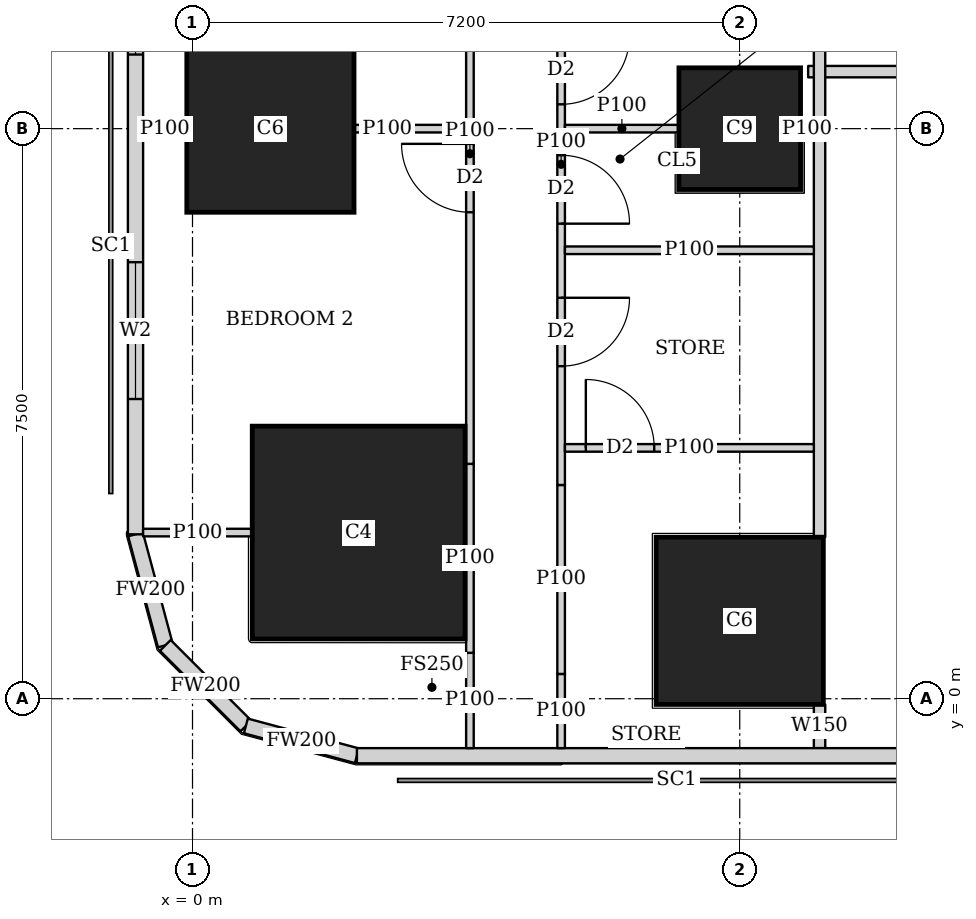
"""IFC4 building model, lengths in metres.
Left out: names, types, materials, properties, quantities, classifications, styles, units other than length and angle.
Written with IfcOpenShell. Run it as: python <this file> out.ifc"""

import sys

from ifc_helpers import new_model, si_unit, direction, frame, frame_2d, origin, origin_2d, place, context, subcontext, project, spatial, rectangle, extrude, element, fill, save


model = new_model("IFC4")
c1 = context("Model", 3, precision=1e-05, world=origin(), true_north=direction((0.0, 1.0)))
c2 = subcontext(c1, "Body", "Model", "MODEL_VIEW")
j1 = project(units=[si_unit("LENGTHUNIT", "METRE"), si_unit("PLANEANGLEUNIT", "RADIAN")], contexts=[c1])
p1 = place(None, origin())
s1 = spatial("IfcSite", under=j1, at=p1, CompositionType="ELEMENT")
p2 = place(p1, origin())
s2 = spatial("IfcBuilding", under=s1, at=p2, CompositionType="ELEMENT")
p3 = place(p2, frame((0.0, 0.0, 122.9)))
s3 = spatial("IfcBuildingStorey", under=s2, at=p3, CompositionType="ELEMENT", Elevation=122.9)
p4 = place(p3, frame((7.2, 1.025, 0.0), z_axis=(0.0, 0.0, 1.0), x_axis=(1.0, 0.0, 0.0)))
e1 = element("IfcColumn", 1, at=p4, inside=s3, PredefinedType="COLUMN", context=c2, shape_type="SweptSolid", body=[
    extrude(rectangle(XDim=2.2, YDim=2.2, at=origin_2d()), origin(), (0.0, 0.0, 1.0), 3.75),
])
p5 = place(p3, frame((2.186, 2.186, 0.0), z_axis=(0.0, 0.0, 1.0), x_axis=(1.0, 0.0, 0.0)))
e2 = element("IfcColumn", 2, at=p5, inside=s3, PredefinedType="COLUMN", context=c2, shape_type="SweptSolid", body=[
    extrude(rectangle(XDim=2.8, YDim=2.8, at=origin_2d()), origin(), (0.0, 0.0, 1.0), 3.75),
])
p6 = place(p3, frame((1.025, 7.5, 0.0), z_axis=(0.0, 0.0, 1.0), x_axis=(1.0, 0.0, 0.0)))
e3 = element("IfcColumn", 3, at=p6, inside=s3, PredefinedType="COLUMN", context=c2, shape_type="SweptSolid", body=[
    extrude(rectangle(XDim=2.2, YDim=2.2, at=origin_2d()), origin(), (0.0, 0.0, 1.0), 3.75),
])
p7 = place(p3, frame((7.2, 7.5, 0.0), z_axis=(0.0, 0.0, 1.0), x_axis=(1.0, 0.0, 0.0)))
e4 = element("IfcColumn", 4, at=p7, inside=s3, PredefinedType="COLUMN", context=c2, shape_type="SweptSolid", body=[
    extrude(rectangle(XDim=1.6, YDim=1.6, at=origin_2d()), origin(), (0.0, 0.0, 1.0), 3.75),
])
p8 = place(p3, frame((2.163, -0.75, 0.0), z_axis=(0.0, 0.0, 1.0), x_axis=(1.0, 0.0, 0.0)))
e5 = element("IfcWall", 5, at=p8, inside=s3, PredefinedType="SOLIDWALL", context=c2, shape_type="SweptSolid", body=[
    extrude(rectangle(XDim=45.628, YDim=0.2, at=frame_2d((22.814, 0.0))), origin(), (0.0, 0.0, 1.0), 3.5),
])
p9 = place(p8, frame((9.537, 0.0, 0.9)))
e6 = element("IfcOpeningElement", 6, at=p9, cuts=e5, PredefinedType="OPENING", context=c2, shape_type="SweptSolid", body=[
    extrude(rectangle(XDim=1.8, YDim=1.5, at=frame_2d((0.9, 0.75))), frame((0.0, 0.11, 0.0), z_axis=(0.0, -1.0, 0.0), x_axis=(1.0, 0.0, 0.0)), (0.0, 0.0, 1.0), 0.22),
])
p10 = place(p8, frame((13.137, 0.0, 0.9)))
e7 = element("IfcOpeningElement", 7, at=p10, cuts=e5, PredefinedType="OPENING", context=c2, shape_type="SweptSolid", body=[
    extrude(rectangle(XDim=1.8, YDim=1.5, at=frame_2d((0.9, 0.75))), frame((0.0, 0.11, 0.0), z_axis=(0.0, -1.0, 0.0), x_axis=(1.0, 0.0, 0.0)), (0.0, 0.0, 1.0), 0.22),
])
p11 = place(p8, frame((16.737, 0.0, 0.9)))
e8 = element("IfcOpeningElement", 8, at=p11, cuts=e5, PredefinedType="OPENING", context=c2, shape_type="SweptSolid", body=[
    extrude(rectangle(XDim=1.8, YDim=1.5, at=frame_2d((0.9, 0.75))), frame((0.0, 0.11, 0.0), z_axis=(0.0, -1.0, 0.0), x_axis=(1.0, 0.0, 0.0)), (0.0, 0.0, 1.0), 0.22),
])
p12 = place(p8, frame((20.337, 0.0, 0.9)))
e9 = element("IfcOpeningElement", 9, at=p12, cuts=e5, PredefinedType="OPENING", context=c2, shape_type="SweptSolid", body=[
    extrude(rectangle(XDim=1.8, YDim=1.5, at=frame_2d((0.9, 0.75))), frame((0.0, 0.11, 0.0), z_axis=(0.0, -1.0, 0.0), x_axis=(1.0, 0.0, 0.0)), (0.0, 0.0, 1.0), 0.22),
])
p13 = place(p8, frame((23.937, 0.0, 0.9)))
e10 = element("IfcOpeningElement", 10, at=p13, cuts=e5, PredefinedType="OPENING", context=c2, shape_type="SweptSolid", body=[
    extrude(rectangle(XDim=1.8, YDim=1.5, at=frame_2d((0.9, 0.75))), frame((0.0, 0.11, 0.0), z_axis=(0.0, -1.0, 0.0), x_axis=(1.0, 0.0, 0.0)), (0.0, 0.0, 1.0), 0.22),
])
p14 = place(p8, frame((27.537, 0.0, 0.9)))
e11 = element("IfcOpeningElement", 11, at=p14, cuts=e5, PredefinedType="OPENING", context=c2, shape_type="SweptSolid", body=[
    extrude(rectangle(XDim=1.8, YDim=1.5, at=frame_2d((0.9, 0.75))), frame((0.0, 0.11, 0.0), z_axis=(0.0, -1.0, 0.0), x_axis=(1.0, 0.0, 0.0)), (0.0, 0.0, 1.0), 0.22),
])
p15 = place(p8, frame((31.137, 0.0, 0.9)))
e12 = element("IfcOpeningElement", 12, at=p15, cuts=e5, PredefinedType="OPENING", context=c2, shape_type="SweptSolid", body=[
    extrude(rectangle(XDim=1.8, YDim=1.5, at=frame_2d((0.9, 0.75))), frame((0.0, 0.11, 0.0), z_axis=(0.0, -1.0, 0.0), x_axis=(1.0, 0.0, 0.0)), (0.0, 0.0, 1.0), 0.22),
])
p16 = place(p8, frame((34.737, 0.0, 0.9)))
e13 = element("IfcOpeningElement", 13, at=p16, cuts=e5, PredefinedType="OPENING", context=c2, shape_type="SweptSolid", body=[
    extrude(rectangle(XDim=1.8, YDim=1.5, at=frame_2d((0.9, 0.75))), frame((0.0, 0.11, 0.0), z_axis=(0.0, -1.0, 0.0), x_axis=(1.0, 0.0, 0.0)), (0.0, 0.0, 1.0), 0.22),
])
p17 = place(p3, frame((-0.75, 42.837, 0.0), z_axis=(0.0, 0.0, 1.0), x_axis=(0.0, -1.0, 0.0)))
e14 = element("IfcWall", 14, at=p17, inside=s3, PredefinedType="SOLIDWALL", context=c2, shape_type="SweptSolid", body=[
    extrude(rectangle(XDim=40.674, YDim=0.2, at=frame_2d((20.337, 0.0))), origin(), (0.0, 0.0, 1.0), 3.5),
])
p18 = place(p17, frame((1.78, 0.0, 0.9)))
e15 = element("IfcOpeningElement", 15, at=p18, cuts=e14, PredefinedType="OPENING", context=c2, shape_type="SweptSolid", body=[
    extrude(rectangle(XDim=1.8, YDim=1.5, at=frame_2d((0.9, 0.75))), frame((0.0, 0.11, 0.0), z_axis=(0.0, -1.0, 0.0), x_axis=(1.0, 0.0, 0.0)), (0.0, 0.0, 1.0), 0.22),
])
p19 = place(p17, frame((6.312, 0.0, 0.9)))
e16 = element("IfcOpeningElement", 16, at=p19, cuts=e14, PredefinedType="OPENING", context=c2, shape_type="SweptSolid", body=[
    extrude(rectangle(XDim=1.8, YDim=1.5, at=frame_2d((0.9, 0.75))), frame((0.0, 0.11, 0.0), z_axis=(0.0, -1.0, 0.0), x_axis=(1.0, 0.0, 0.0)), (0.0, 0.0, 1.0), 0.22),
])
p20 = place(p17, frame((10.062, 0.0, 0.9)))
e17 = element("IfcOpeningElement", 17, at=p20, cuts=e14, PredefinedType="OPENING", context=c2, shape_type="SweptSolid", body=[
    extrude(rectangle(XDim=1.8, YDim=1.5, at=frame_2d((0.9, 0.75))), frame((0.0, 0.11, 0.0), z_axis=(0.0, -1.0, 0.0), x_axis=(1.0, 0.0, 0.0)), (0.0, 0.0, 1.0), 0.22),
])
p21 = place(p17, frame((13.812, 0.0, 0.9)))
e18 = element("IfcOpeningElement", 18, at=p21, cuts=e14, PredefinedType="OPENING", context=c2, shape_type="SweptSolid", body=[
    extrude(rectangle(XDim=1.8, YDim=1.5, at=frame_2d((0.9, 0.75))), frame((0.0, 0.11, 0.0), z_axis=(0.0, -1.0, 0.0), x_axis=(1.0, 0.0, 0.0)), (0.0, 0.0, 1.0), 0.22),
])
p22 = place(p17, frame((17.562, 0.0, 0.9)))
e19 = element("IfcOpeningElement", 19, at=p22, cuts=e14, PredefinedType="OPENING", context=c2, shape_type="SweptSolid", body=[
    extrude(rectangle(XDim=1.8, YDim=1.5, at=frame_2d((0.9, 0.75))), frame((0.0, 0.11, 0.0), z_axis=(0.0, -1.0, 0.0), x_axis=(1.0, 0.0, 0.0)), (0.0, 0.0, 1.0), 0.22),
])
p23 = place(p17, frame((21.312, 0.0, 0.9)))
e20 = element("IfcOpeningElement", 20, at=p23, cuts=e14, PredefinedType="OPENING", context=c2, shape_type="SweptSolid", body=[
    extrude(rectangle(XDim=1.8, YDim=1.5, at=frame_2d((0.9, 0.75))), frame((0.0, 0.11, 0.0), z_axis=(0.0, -1.0, 0.0), x_axis=(1.0, 0.0, 0.0)), (0.0, 0.0, 1.0), 0.22),
])
p24 = place(p17, frame((25.062, 0.0, 0.9)))
e21 = element("IfcOpeningElement", 21, at=p24, cuts=e14, PredefinedType="OPENING", context=c2, shape_type="SweptSolid", body=[
    extrude(rectangle(XDim=1.8, YDim=1.5, at=frame_2d((0.9, 0.75))), frame((0.0, 0.11, 0.0), z_axis=(0.0, -1.0, 0.0), x_axis=(1.0, 0.0, 0.0)), (0.0, 0.0, 1.0), 0.22),
])
p25 = place(p17, frame((28.812, 0.0, 0.9)))
e22 = element("IfcOpeningElement", 22, at=p25, cuts=e14, PredefinedType="OPENING", context=c2, shape_type="SweptSolid", body=[
    extrude(rectangle(XDim=1.8, YDim=1.5, at=frame_2d((0.9, 0.75))), frame((0.0, 0.11, 0.0), z_axis=(0.0, -1.0, 0.0), x_axis=(1.0, 0.0, 0.0)), (0.0, 0.0, 1.0), 0.22),
])
p26 = place(p17, frame((32.562, 0.0, 0.9)))
e23 = element("IfcOpeningElement", 23, at=p26, cuts=e14, PredefinedType="OPENING", context=c2, shape_type="SweptSolid", body=[
    extrude(rectangle(XDim=1.8, YDim=1.5, at=frame_2d((0.9, 0.75))), frame((0.0, 0.11, 0.0), z_axis=(0.0, -1.0, 0.0), x_axis=(1.0, 0.0, 0.0)), (0.0, 0.0, 1.0), 0.22),
])
p27 = place(p17, frame((37.094, 0.0, 0.9)))
e24 = element("IfcOpeningElement", 24, at=p27, cuts=e14, PredefinedType="OPENING", context=c2, shape_type="SweptSolid", body=[
    extrude(rectangle(XDim=1.8, YDim=1.5, at=frame_2d((0.9, 0.75))), frame((0.0, 0.11, 0.0), z_axis=(0.0, -1.0, 0.0), x_axis=(1.0, 0.0, 0.0)), (0.0, 0.0, 1.0), 0.22),
])
p28 = place(p3, frame((-0.75, 2.163, 0.0), z_axis=(0.0, 0.0, 1.0), x_axis=(0.259168954497, -0.965832000415, 0.0)))
e25 = element("IfcWall", 25, at=p28, inside=s3, PredefinedType="SOLIDWALL", context=c2, shape_type="SweptSolid", body=[
    extrude(rectangle(XDim=1.513, YDim=0.2, at=frame_2d((0.756, 0.0))), origin(), (0.0, 0.0, 1.0), 3.5),
])
p29 = place(p3, frame((-0.358, 0.702, 0.0), z_axis=(0.0, 0.0, 1.0), x_axis=(0.707106781187, -0.707106781187, 0.0)))
e26 = element("IfcWall", 26, at=p29, inside=s3, PredefinedType="SOLIDWALL", context=c2, shape_type="SweptSolid", body=[
    extrude(rectangle(XDim=1.499, YDim=0.2, at=frame_2d((0.75, 0.0))), origin(), (0.0, 0.0, 1.0), 3.5),
])
p30 = place(p3, frame((0.702, -0.358, 0.0), z_axis=(0.0, 0.0, 1.0), x_axis=(0.965832000415, -0.259168954497, 0.0)))
e27 = element("IfcWall", 27, at=p30, inside=s3, PredefinedType="SOLIDWALL", context=c2, shape_type="SweptSolid", body=[
    extrude(rectangle(XDim=1.513, YDim=0.2, at=frame_2d((0.756, 0.0))), origin(), (0.0, 0.0, 1.0), 3.5),
])
p31 = place(p3, frame((8.25, -0.65, 0.0), z_axis=(0.0, 0.0, 1.0), x_axis=(0.0, 1.0, 0.0)))
e28 = element("IfcWall", 28, at=p31, inside=s3, PredefinedType="SOLIDWALL", context=c2, shape_type="SweptSolid", body=[
    extrude(rectangle(XDim=0.574, YDim=0.15, at=frame_2d((0.287, 0.0))), origin(), (0.0, 0.0, 1.0), 3.5),
])
p32 = place(p3, frame((8.25, 2.126, 0.0), z_axis=(0.0, 0.0, 1.0), x_axis=(0.0, 1.0, 0.0)))
e29 = element("IfcWall", 29, at=p32, inside=s3, PredefinedType="SOLIDWALL", context=c2, shape_type="SweptSolid", body=[
    extrude(rectangle(XDim=40.773, YDim=0.15, at=frame_2d((20.386, 0.0))), origin(), (0.0, 0.0, 1.0), 3.5),
])
p33 = place(p32, frame((10.286, 0.0, 0.0)))
e30 = element("IfcOpeningElement", 30, at=p33, cuts=e29, PredefinedType="OPENING", context=c2, shape_type="SweptSolid", body=[
    extrude(rectangle(XDim=1.0, YDim=2.1, at=frame_2d((0.5, 1.05))), frame((0.0, 0.085, 0.0), z_axis=(0.0, -1.0, 0.0), x_axis=(1.0, 0.0, 0.0)), (0.0, 0.0, 1.0), 0.17),
])
p34 = place(p32, frame((14.461, 0.0, 0.0)))
e31 = element("IfcOpeningElement", 31, at=p34, cuts=e29, PredefinedType="OPENING", context=c2, shape_type="SweptSolid", body=[
    extrude(rectangle(XDim=1.0, YDim=2.1, at=frame_2d((0.5, 1.05))), frame((0.0, 0.085, 0.0), z_axis=(0.0, -1.0, 0.0), x_axis=(1.0, 0.0, 0.0)), (0.0, 0.0, 1.0), 0.17),
])
p35 = place(p32, frame((21.962, 0.0, 0.0)))
e32 = element("IfcOpeningElement", 32, at=p35, cuts=e29, PredefinedType="OPENING", context=c2, shape_type="SweptSolid", body=[
    extrude(rectangle(XDim=1.0, YDim=2.1, at=frame_2d((0.5, 1.05))), frame((0.0, 0.085, 0.0), z_axis=(0.0, -1.0, 0.0), x_axis=(1.0, 0.0, 0.0)), (0.0, 0.0, 1.0), 0.17),
])
p36 = place(p32, frame((29.461, 0.0, 0.0)))
e33 = element("IfcOpeningElement", 33, at=p36, cuts=e29, PredefinedType="OPENING", context=c2, shape_type="SweptSolid", body=[
    extrude(rectangle(XDim=1.0, YDim=2.1, at=frame_2d((0.5, 1.05))), frame((0.0, 0.085, 0.0), z_axis=(0.0, -1.0, 0.0), x_axis=(1.0, 0.0, 0.0)), (0.0, 0.0, 1.0), 0.17),
])
p37 = place(p3, frame((13.599, 8.25, 0.0), z_axis=(0.0, 0.0, 1.0), x_axis=(-1.0, 0.0, 0.0)))
e34 = element("IfcWall", 34, at=p37, inside=s3, PredefinedType="SOLIDWALL", context=c2, shape_type="SweptSolid", body=[
    extrude(rectangle(XDim=5.499, YDim=0.15, at=frame_2d((2.75, 0.0))), origin(), (0.0, 0.0, 1.0), 3.5),
])
p38 = place(p37, frame((1.774, 0.0, 0.0)))
e35 = element("IfcOpeningElement", 35, at=p38, cuts=e34, PredefinedType="OPENING", context=c2, shape_type="SweptSolid", body=[
    extrude(rectangle(XDim=1.0, YDim=2.1, at=frame_2d((0.5, 1.05))), frame((0.0, 0.085, 0.0), z_axis=(0.0, -1.0, 0.0), x_axis=(1.0, 0.0, 0.0)), (0.0, 0.0, 1.0), 0.17),
])
p39 = place(p3, frame((3.65, -0.65, 0.0), z_axis=(0.0, 0.0, 1.0), x_axis=(0.0, 1.0, 0.0)))
e36 = element("IfcWall", 36, at=p39, inside=s3, PredefinedType="PARTITIONING", context=c2, shape_type="SweptSolid", body=[
    extrude(rectangle(XDim=1.254, YDim=0.1, at=frame_2d((0.627, 0.0))), origin(), (0.0, 0.0, 1.0), 3.5),
])
p40 = place(p3, frame((3.65, 0.604, 0.0), z_axis=(0.0, 0.0, 1.0), x_axis=(0.0, 1.0, 0.0)))
e37 = element("IfcWall", 37, at=p40, inside=s3, PredefinedType="PARTITIONING", context=c2, shape_type="SweptSolid", body=[
    extrude(rectangle(XDim=2.486, YDim=0.1, at=frame_2d((1.243, 0.0))), origin(), (0.0, 0.0, 1.0), 2.05),
])
p41 = place(p3, frame((3.65, 3.09, 0.0), z_axis=(0.0, 0.0, 1.0), x_axis=(0.0, 1.0, 0.0)))
e38 = element("IfcWall", 38, at=p41, inside=s3, PredefinedType="PARTITIONING", context=c2, shape_type="SweptSolid", body=[
    extrude(rectangle(XDim=8.16, YDim=0.1, at=frame_2d((4.08, 0.0))), origin(), (0.0, 0.0, 1.0), 3.5),
])
p42 = place(p41, frame((7.06, 0.0, 0.0)))
e39 = element("IfcOpeningElement", 39, at=p42, cuts=e38, PredefinedType="OPENING", context=c2, shape_type="SweptSolid", body=[
    extrude(rectangle(XDim=0.9, YDim=2.1, at=frame_2d((0.45, 1.05))), frame((0.0, 0.06, 0.0), z_axis=(0.0, -1.0, 0.0), x_axis=(1.0, 0.0, 0.0)), (0.0, 0.0, 1.0), 0.12),
])
p43 = place(p41, frame((3.31, 0.0, 0.0)))
e40 = element("IfcOpeningElement", 40, at=p43, cuts=e38, PredefinedType="OPENING", context=c2, shape_type="SweptSolid", body=[
    extrude(rectangle(XDim=0.9, YDim=2.1, at=frame_2d((0.45, 1.05))), frame((0.0, 0.06, 0.0), z_axis=(0.0, -1.0, 0.0), x_axis=(1.0, 0.0, 0.0)), (0.0, 0.0, 1.0), 0.12),
])
p44 = place(p3, frame((4.85, -0.65, 0.0), z_axis=(0.0, 0.0, 1.0), x_axis=(0.0, 1.0, 0.0)))
e41 = element("IfcWall", 41, at=p44, inside=s3, PredefinedType="PARTITIONING", context=c2, shape_type="SweptSolid", body=[
    extrude(rectangle(XDim=0.976, YDim=0.1, at=frame_2d((0.488, 0.0))), origin(), (0.0, 0.0, 1.0), 3.5),
])
p45 = place(p3, frame((4.85, 0.326, 0.0), z_axis=(0.0, 0.0, 1.0), x_axis=(0.0, 1.0, 0.0)))
e42 = element("IfcWall", 42, at=p45, inside=s3, PredefinedType="PARTITIONING", context=c2, shape_type="SweptSolid", body=[
    extrude(rectangle(XDim=2.486, YDim=0.1, at=frame_2d((1.243, 0.0))), origin(), (0.0, 0.0, 1.0), 2.05),
])
p46 = place(p3, frame((4.85, 2.812, 0.0), z_axis=(0.0, 0.0, 1.0), x_axis=(0.0, 1.0, 0.0)))
e43 = element("IfcWall", 43, at=p46, inside=s3, PredefinedType="PARTITIONING", context=c2, shape_type="SweptSolid", body=[
    extrude(rectangle(XDim=8.438, YDim=0.1, at=frame_2d((4.219, 0.0))), origin(), (0.0, 0.0, 1.0), 3.5),
])
p47 = place(p46, frame((6.883, 0.0, 0.0)))
e44 = element("IfcOpeningElement", 44, at=p47, cuts=e43, PredefinedType="OPENING", context=c2, shape_type="SweptSolid", body=[
    extrude(rectangle(XDim=0.9, YDim=2.1, at=frame_2d((0.45, 1.05))), frame((0.0, 0.06, 0.0), z_axis=(0.0, -1.0, 0.0), x_axis=(1.0, 0.0, 0.0)), (0.0, 0.0, 1.0), 0.12),
])
p48 = place(p46, frame((3.438, 0.0, 0.0)))
e45 = element("IfcOpeningElement", 45, at=p48, cuts=e43, PredefinedType="OPENING", context=c2, shape_type="SweptSolid", body=[
    extrude(rectangle(XDim=0.9, YDim=2.1, at=frame_2d((0.45, 1.05))), frame((0.0, 0.06, 0.0), z_axis=(0.0, -1.0, 0.0), x_axis=(1.0, 0.0, 0.0)), (0.0, 0.0, 1.0), 0.12),
])
p49 = place(p46, frame((5.008, 0.0, 0.0)))
e46 = element("IfcOpeningElement", 46, at=p49, cuts=e43, PredefinedType="OPENING", context=c2, shape_type="SweptSolid", body=[
    extrude(rectangle(XDim=0.9, YDim=2.1, at=frame_2d((0.45, 1.05))), frame((0.0, 0.06, 0.0), z_axis=(0.0, -1.0, 0.0), x_axis=(1.0, 0.0, 0.0)), (0.0, 0.0, 1.0), 0.12),
])
p50 = place(p46, frame((1.563, 0.0, 0.0)))
e47 = element("IfcOpeningElement", 47, at=p50, cuts=e43, PredefinedType="OPENING", context=c2, shape_type="SweptSolid", body=[
    extrude(rectangle(XDim=0.9, YDim=2.1, at=frame_2d((0.45, 1.05))), frame((0.0, 0.06, 0.0), z_axis=(0.0, -1.0, 0.0), x_axis=(1.0, 0.0, 0.0)), (0.0, 0.0, 1.0), 0.12),
])
p51 = place(p3, frame((-0.65, 2.186, 0.0), z_axis=(0.0, 0.0, 1.0), x_axis=(1.0, 0.0, 0.0)))
e48 = element("IfcWall", 48, at=p51, inside=s3, PredefinedType="PARTITIONING", context=c2, shape_type="SweptSolid", body=[
    extrude(rectangle(XDim=1.435, YDim=0.1, at=frame_2d((0.717, 0.0))), origin(), (0.0, 0.0, 1.0), 3.5),
])
p52 = place(p3, frame((-0.65, 7.5, 0.0), z_axis=(0.0, 0.0, 1.0), x_axis=(1.0, 0.0, 0.0)))
e49 = element("IfcWall", 49, at=p52, inside=s3, PredefinedType="PARTITIONING", context=c2, shape_type="SweptSolid", body=[
    extrude(rectangle(XDim=0.574, YDim=0.1, at=frame_2d((0.287, 0.0))), origin(), (0.0, 0.0, 1.0), 2.05),
])
p53 = place(p3, frame((2.126, 7.5, 0.0), z_axis=(0.0, 0.0, 1.0), x_axis=(1.0, 0.0, 0.0)))
e50 = element("IfcWall", 50, at=p53, inside=s3, PredefinedType="PARTITIONING", context=c2, shape_type="SweptSolid", body=[
    extrude(rectangle(XDim=1.474, YDim=0.1, at=frame_2d((0.737, 0.0))), origin(), (0.0, 0.0, 1.0), 2.05),
])
p54 = place(p3, frame((4.9, 7.5, 0.0), z_axis=(0.0, 0.0, 1.0), x_axis=(1.0, 0.0, 0.0)))
e51 = element("IfcWall", 51, at=p54, inside=s3, PredefinedType="PARTITIONING", context=c2, shape_type="SweptSolid", body=[
    extrude(rectangle(XDim=1.499, YDim=0.1, at=frame_2d((0.75, 0.0))), origin(), (0.0, 0.0, 1.0), 3.5),
])
p55 = place(p3, frame((8.001, 7.5, 0.0), z_axis=(0.0, 0.0, 1.0), x_axis=(1.0, 0.0, 0.0)))
e52 = element("IfcWall", 52, at=p55, inside=s3, PredefinedType="PARTITIONING", context=c2, shape_type="SweptSolid", body=[
    extrude(rectangle(XDim=0.174, YDim=0.1, at=frame_2d((0.087, 0.0))), origin(), (0.0, 0.0, 1.0), 3.5),
])
p56 = place(p3, frame((4.9, 5.9, 0.0), z_axis=(0.0, 0.0, 1.0), x_axis=(1.0, 0.0, 0.0)))
e53 = element("IfcWall", 53, at=p56, inside=s3, PredefinedType="PARTITIONING", context=c2, shape_type="SweptSolid", body=[
    extrude(rectangle(XDim=3.275, YDim=0.1, at=frame_2d((1.638, 0.0))), origin(), (0.0, 0.0, 1.0), 3.5),
])
p57 = place(p3, frame((8.175, 3.3, 0.0), z_axis=(0.0, 0.0, 1.0), x_axis=(-1.0, 0.0, 0.0)))
e54 = element("IfcWall", 54, at=p57, inside=s3, PredefinedType="PARTITIONING", context=c2, shape_type="SweptSolid", body=[
    extrude(rectangle(XDim=3.275, YDim=0.1, at=frame_2d((1.638, 0.0))), origin(), (0.0, 0.0, 1.0), 3.5),
])
p58 = place(p57, frame((2.1, 0.0, 0.0)))
e55 = element("IfcOpeningElement", 55, at=p58, cuts=e54, PredefinedType="OPENING", context=c2, shape_type="SweptSolid", body=[
    extrude(rectangle(XDim=0.9, YDim=2.1, at=frame_2d((0.45, 1.05))), frame((0.0, 0.06, 0.0), z_axis=(0.0, -1.0, 0.0), x_axis=(1.0, 0.0, 0.0)), (0.0, 0.0, 1.0), 0.12),
])
p59 = place(p26, origin())
e56 = element("IfcWindow", 56, at=p59, inside=s3, PartitioningType="SINGLE_PANEL", PredefinedType="WINDOW", context=c2, shape_type="SweptSolid", body=[
    extrude(rectangle(XDim=1.8, YDim=1.5, at=frame_2d((0.9, 0.75))), frame((0.0, 0.03, 0.0), z_axis=(0.0, -1.0, 0.0), x_axis=(1.0, 0.0, 0.0)), (0.0, 0.0, 1.0), 0.06),
])
fill(e23, e56)
p60 = place(p27, origin())
e57 = element("IfcWindow", 57, at=p60, inside=s3, PartitioningType="SINGLE_PANEL", PredefinedType="WINDOW", context=c2, shape_type="SweptSolid", body=[
    extrude(rectangle(XDim=1.8, YDim=1.5, at=frame_2d((0.9, 0.75))), frame((0.0, 0.03, 0.0), z_axis=(0.0, -1.0, 0.0), x_axis=(1.0, 0.0, 0.0)), (0.0, 0.0, 1.0), 0.06),
])
fill(e24, e57)
p61 = place(p43, origin())
e58 = element("IfcDoor", 58, at=p61, inside=s3, OperationType="SINGLE_SWING_RIGHT", PredefinedType="DOOR", context=c2, shape_type="SweptSolid", body=[
    extrude(rectangle(XDim=0.9, YDim=2.1, at=frame_2d((0.45, 1.05))), frame((0.0, 0.025, 0.0), z_axis=(0.0, -1.0, 0.0), x_axis=(1.0, 0.0, 0.0)), (0.0, 0.0, 1.0), 0.05),
])
fill(e40, e58)
p62 = place(p48, origin())
e59 = element("IfcDoor", 59, at=p62, inside=s3, OperationType="SINGLE_SWING_RIGHT", PredefinedType="DOOR", context=c2, shape_type="SweptSolid", body=[
    extrude(rectangle(XDim=0.9, YDim=2.1, at=frame_2d((0.45, 1.05))), frame((0.0, 0.025, 0.0), z_axis=(0.0, -1.0, 0.0), x_axis=(1.0, 0.0, 0.0)), (0.0, 0.0, 1.0), 0.05),
])
fill(e45, e59)
p63 = place(p49, origin())
e60 = element("IfcDoor", 60, at=p63, inside=s3, OperationType="SINGLE_SWING_LEFT", PredefinedType="DOOR", context=c2, shape_type="SweptSolid", body=[
    extrude(rectangle(XDim=0.9, YDim=2.1, at=frame_2d((0.45, 1.05))), frame((0.0, 0.025, 0.0), z_axis=(0.0, -1.0, 0.0), x_axis=(1.0, 0.0, 0.0)), (0.0, 0.0, 1.0), 0.05),
])
fill(e46, e60)
p64 = place(p50, origin())
e61 = element("IfcDoor", 61, at=p64, inside=s3, OperationType="SINGLE_SWING_LEFT", PredefinedType="DOOR", context=c2, shape_type="SweptSolid", body=[
    extrude(rectangle(XDim=0.9, YDim=2.1, at=frame_2d((0.45, 1.05))), frame((0.0, 0.025, 0.0), z_axis=(0.0, -1.0, 0.0), x_axis=(1.0, 0.0, 0.0)), (0.0, 0.0, 1.0), 0.05),
])
fill(e47, e61)
p65 = place(p58, origin())
e62 = element("IfcDoor", 62, at=p65, inside=s3, OperationType="SINGLE_SWING_LEFT", PredefinedType="DOOR", context=c2, shape_type="SweptSolid", body=[
    extrude(rectangle(XDim=0.9, YDim=2.1, at=frame_2d((0.45, 1.05))), frame((0.0, 0.025, 0.0), z_axis=(0.0, -1.0, 0.0), x_axis=(1.0, 0.0, 0.0)), (0.0, 0.0, 1.0), 0.05),
])
fill(e55, e62)
save(model, sys.argv[1])
